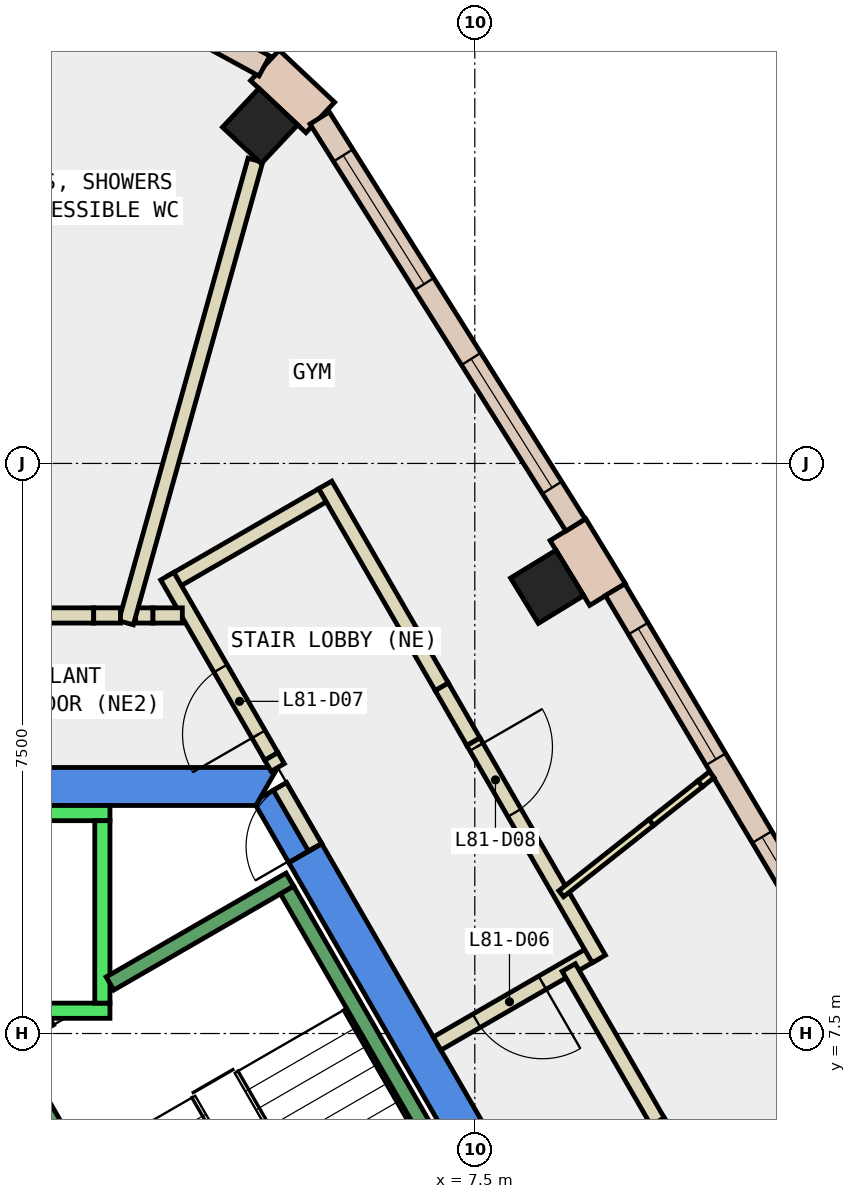
"""IFC4 building model, lengths in metres.
Left out: names, types, materials, properties, quantities, classifications, styles, units other than length and angle.
Written with IfcOpenShell. Run it as: python <this file> out.ifc"""

import sys

from ifc_helpers import new_model, si_unit, direction, frame, frame_2d, origin, origin_2d, place, context, subcontext, project, spatial, polyline, rectangle, outline, extrude, element, fill, save


model = new_model("IFC4")
c1 = context("Model", 3, precision=1e-05, world=origin(), true_north=direction((0.0, 1.0)))
c2 = subcontext(c1, "Body", "Model", "MODEL_VIEW")
j1 = project(units=[si_unit("LENGTHUNIT", "METRE"), si_unit("PLANEANGLEUNIT", "RADIAN")], contexts=[c1])
p1 = place(None, origin())
s1 = spatial("IfcSite", under=j1, at=p1, CompositionType="ELEMENT")
p2 = place(p1, origin())
s2 = spatial("IfcBuilding", under=s1, at=p2, CompositionType="ELEMENT")
p3 = place(p2, frame((0.0, 0.0, 344.9)))
s3 = spatial("IfcBuildingStorey", under=s2, at=p3, CompositionType="ELEMENT", Elevation=344.9)
for number, where, z_axis, x_axis in (
    (1, (8.452, 13.377, -0.35), (0.0, 0.0, 1.0), (-0.522, 0.853, 0.0)),
    (2, (4.675, 19.439, -0.35), (0.0, 0.0, 1.0), (-0.729, 0.685, 0.0)),
):
    element("IfcColumn", number, at=place(p3, frame(where, z_axis=z_axis, x_axis=x_axis)), inside=s3, PredefinedType="COLUMN", context=c2, shape_type="SweptSolid", body=[
        extrude(rectangle(XDim=0.7, YDim=0.7, at=origin_2d()), origin(), (0.0, 0.0, 1.0), 4.4),
    ])
p4 = place(p3, frame((0.0, 0.0, -0.35)))
e3 = element("IfcWall", 3, at=p4, inside=s3, PredefinedType="SHEAR", context=c2, shape_type="SweptSolid", body=[
    extrude(outline(polyline([(5.486, 9.998), (5.053, 9.748), (9.238, 2.5), (9.815, 2.5), (5.486, 9.998)])), origin(), (0.0, 0.0, 1.0), 4.4),
])
p5 = place(p3, frame((0.0, 0.0, 3.6)))
e4 = element("IfcWall", 4, at=p5, inside=s3, PredefinedType="SHEAR", context=c2, shape_type="SweptSolid", body=[
    extrude(outline(polyline([(5.022, 10.8), (4.677, 10.601), (4.619, 10.5), (5.053, 9.748), (5.486, 9.998), (5.022, 10.8)])), origin(), (0.0, 0.0, 1.0), 0.45),
])
p6 = place(p3, frame((0.0, 0.0, -0.35)))
e5 = element("IfcWall", 5, at=p6, inside=s3, PredefinedType="SHEAR", context=c2, shape_type="SweptSolid", body=[
    extrude(outline(polyline([(4.907, 11.0), (-4.907, 11.0), (-4.619, 10.5), (4.619, 10.5), (4.907, 11.0)])), origin(), (0.0, 0.0, 1.0), 4.4),
])
p7 = place(p3, frame((9.246, 13.276, 0.0), z_axis=(0.0, 0.0, 1.0), x_axis=(-0.521232636172, 0.853414634857, 0.0)))
e6 = element("IfcWall", 6, at=p7, inside=s3, PredefinedType="STANDARD", context=c2, shape_type="SweptSolid", body=[
    extrude(rectangle(XDim=1.0, YDim=0.55, at=frame_2d((0.5, 0.0))), origin(), (0.0, 0.0, 1.0), 4.05),
])
p8 = place(p3, frame((5.467, 19.552, 0.0), z_axis=(0.0, 0.0, 1.0), x_axis=(-0.728729965402, 0.684801166416, 0.0)))
e7 = element("IfcWall", 7, at=p8, inside=s3, PredefinedType="STANDARD", context=c2, shape_type="SweptSolid", body=[
    extrude(rectangle(XDim=1.0, YDim=0.55, at=frame_2d((0.5, 0.0))), origin(), (0.0, 0.0, 1.0), 4.05),
])
p9 = place(p3, frame((12.605, 7.854, 0.0), z_axis=(0.0, 0.0, 1.0), x_axis=(-0.510686403068, 0.859767060152, 0.0)))
e8 = element("IfcWall", 8, at=p9, inside=s3, PredefinedType="STANDARD", context=c2, shape_type="SweptSolid", body=[
    extrude(rectangle(XDim=6.38, YDim=0.3, at=frame_2d((3.19, 0.0))), origin(), (0.0, 0.0, 1.0), 4.05),
])
p10 = place(p9, frame((0.595, 0.0, 0.9)))
e9 = element("IfcOpeningElement", 9, at=p10, cuts=e8, PredefinedType="OPENING", context=c2, shape_type="SweptSolid", body=[
    extrude(rectangle(XDim=2.0, YDim=3.0, at=frame_2d((1.0, 1.5))), frame((0.0, 0.16, 0.0), z_axis=(0.0, -1.0, 0.0), x_axis=(1.0, 0.0, 0.0)), (0.0, 0.0, 1.0), 0.32),
])
p11 = place(p9, frame((3.785, 0.0, 0.9)))
e10 = element("IfcOpeningElement", 10, at=p11, cuts=e8, PredefinedType="OPENING", context=c2, shape_type="SweptSolid", body=[
    extrude(rectangle(XDim=2.0, YDim=3.0, at=frame_2d((1.0, 1.5))), frame((0.0, 0.16, 0.0), z_axis=(0.0, -1.0, 0.0), x_axis=(1.0, 0.0, 0.0)), (0.0, 0.0, 1.0), 0.32),
])
p12 = place(p3, frame((8.826, 14.19, 0.0), z_axis=(0.0, 0.0, 1.0), x_axis=(-0.532279831475, 0.846568473902, 0.0)))
e11 = element("IfcWall", 11, at=p12, inside=s3, PredefinedType="STANDARD", context=c2, shape_type="SweptSolid", body=[
    extrude(rectangle(XDim=6.325, YDim=0.3, at=frame_2d((3.163, 0.0))), origin(), (0.0, 0.0, 1.0), 4.05),
])
p13 = place(p12, frame((0.581, 0.0, 0.9)))
e12 = element("IfcOpeningElement", 12, at=p13, cuts=e11, PredefinedType="OPENING", context=c2, shape_type="SweptSolid", body=[
    extrude(rectangle(XDim=2.0, YDim=3.0, at=frame_2d((1.0, 1.5))), frame((0.0, 0.16, 0.0), z_axis=(0.0, -1.0, 0.0), x_axis=(1.0, 0.0, 0.0)), (0.0, 0.0, 1.0), 0.32),
])
p14 = place(p12, frame((3.744, 0.0, 0.9)))
e13 = element("IfcOpeningElement", 13, at=p14, cuts=e11, PredefinedType="OPENING", context=c2, shape_type="SweptSolid", body=[
    extrude(rectangle(XDim=2.0, YDim=3.0, at=frame_2d((1.0, 1.5))), frame((0.0, 0.16, 0.0), z_axis=(0.0, -1.0, 0.0), x_axis=(1.0, 0.0, 0.0)), (0.0, 0.0, 1.0), 0.32),
])
p15 = place(p3, frame((4.732, 20.229, 0.0), z_axis=(0.0, 0.0, 1.0), x_axis=(-0.8782630237, 0.478177855197, 0.0)))
e14 = element("IfcWall", 14, at=p15, inside=s3, PredefinedType="STANDARD", context=c2, shape_type="SweptSolid", body=[
    extrude(rectangle(XDim=4.364, YDim=0.3, at=frame_2d((2.182, 0.0))), origin(), (0.0, 0.0, 1.0), 4.05),
])
p16 = place(p15, frame((1.482, 0.0, 0.9)))
e15 = element("IfcOpeningElement", 15, at=p16, cuts=e14, PredefinedType="OPENING", context=c2, shape_type="SweptSolid", body=[
    extrude(rectangle(XDim=1.4, YDim=3.0, at=frame_2d((0.7, 1.5))), frame((0.0, 0.16, 0.0), z_axis=(0.0, -1.0, 0.0), x_axis=(1.0, 0.0, 0.0)), (0.0, 0.0, 1.0), 0.32),
])
p17 = place(p3, frame((9.082, 8.568, 0.0), z_axis=(0.0, 0.0, 1.0), x_axis=(-0.865955154139, -0.50012165622, 0.0)))
e16 = element("IfcWall", 16, at=p17, inside=s3, PredefinedType="PARTITIONING", context=c2, shape_type="SweptSolid", body=[
    extrude(rectangle(XDim=2.4, YDim=0.2, at=frame_2d((1.2, 0.0))), origin(), (0.0, 0.0, 1.0), 4.05),
])
p18 = place(p17, frame((0.8, 0.0, 0.0)))
e17 = element("IfcOpeningElement", 17, at=p18, cuts=e16, PredefinedType="OPENING", context=c2, shape_type="SweptSolid", body=[
    extrude(rectangle(XDim=1.0, YDim=2.1, at=frame_2d((0.5, 1.05))), frame((0.0, 0.11, 0.0), z_axis=(0.0, -1.0, 0.0), x_axis=(1.0, 0.0, 0.0)), (0.0, 0.0, 1.0), 0.22),
])
p19 = place(p3, frame((4.907, 11.0, 0.0), z_axis=(0.0, 0.0, 1.0), x_axis=(-0.5004692653, 0.865754303766, 0.0)))
e18 = element("IfcWall", 18, at=p19, inside=s3, PredefinedType="PARTITIONING", context=c2, shape_type="SweptSolid", body=[
    extrude(rectangle(XDim=0.17, YDim=0.2, at=frame_2d((0.085, 0.0))), origin(), (0.0, 0.0, 1.0), 2.4),
])
p20 = place(p3, frame((5.532, 14.717, 0.0), z_axis=(0.0, 0.0, 1.0), x_axis=(0.500119776898, -0.865956239515, 0.0)))
e19 = element("IfcWall", 19, at=p20, inside=s3, PredefinedType="PARTITIONING", context=c2, shape_type="SweptSolid", body=[
    extrude(rectangle(XDim=3.067, YDim=0.2, at=frame_2d((1.534, 0.0))), origin(), (0.0, 0.0, 1.0), 4.05),
])
p21 = place(p3, frame((3.504, 13.43, 0.0), z_axis=(0.0, 0.0, 1.0), x_axis=(0.865927408828, 0.500169693844, 0.0)))
e20 = element("IfcWall", 20, at=p21, inside=s3, PredefinedType="PARTITIONING", context=c2, shape_type="SweptSolid", body=[
    extrude(rectangle(XDim=2.3, YDim=0.2, at=frame_2d((1.15, 0.0))), origin(), (0.0, 0.0, 1.0), 4.05),
])
p22 = place(p3, frame((8.736, 8.368, 0.0), z_axis=(0.0, 0.0, 1.0), x_axis=(0.500041339179, -0.866001535283, 0.0)))
e21 = element("IfcWall", 21, at=p22, inside=s3, PredefinedType="PARTITIONING", context=c2, shape_type="SweptSolid", body=[
    extrude(rectangle(XDim=2.342, YDim=0.2, at=frame_2d((1.171, 0.0))), origin(), (0.0, 0.0, 1.0), 4.05),
])
p23 = place(p3, frame((3.038, 13.0, 0.0), z_axis=(0.0, 0.0, 1.0), x_axis=(1.0, 0.0, 0.0)))
e22 = element("IfcWall", 22, at=p23, inside=s3, PredefinedType="PARTITIONING", context=c2, shape_type="SweptSolid", body=[
    extrude(rectangle(XDim=0.228, YDim=0.2, at=frame_2d((0.114, 0.0))), origin(), (0.0, 0.0, 1.0), 1.95),
])
p24 = place(p3, frame((10.617, 10.906, 0.0), z_axis=(0.0, 0.0, 1.0), x_axis=(-0.781848913268, -0.6234679437, 0.0)))
e23 = element("IfcWall", 23, at=p24, inside=s3, PredefinedType="PARTITIONING", context=c2, shape_type="SweptSolid", body=[
    extrude(rectangle(XDim=0.194, YDim=0.1, at=frame_2d((0.097, 0.0))), origin(), (0.0, 0.0, 1.0), 4.05),
])
p25 = place(p3, frame((2.911, 12.904, 0.0), z_axis=(0.0, 0.0, 1.0), x_axis=(0.269389141698, 0.963031406723, 0.0)))
e24 = element("IfcWall", 24, at=p25, inside=s3, PredefinedType="PARTITIONING", context=c2, shape_type="SweptSolid", body=[
    extrude(rectangle(XDim=6.319, YDim=0.2, at=frame_2d((3.159, 0.0))), origin(), (0.0, 0.0, 1.0), 1.95),
])
p26 = place(p3, frame((5.399, 9.948, 0.0), z_axis=(0.0, 0.0, 1.0), x_axis=(-0.499882215713, 0.866093395895, 0.0)))
e25 = element("IfcWall", 25, at=p26, inside=s3, PredefinedType="PARTITIONING", context=c2, shape_type="SweptSolid", body=[
    extrude(rectangle(XDim=0.926, YDim=0.2, at=frame_2d((0.463, 0.0))), origin(), (0.0, 0.0, 1.0), 2.4),
])
p27 = place(p26, frame((0.017, 0.0, 0.0)))
e26 = element("IfcOpeningElement", 26, at=p27, cuts=e25, PredefinedType="OPENING", context=c2, shape_type="SweptSolid", body=[
    extrude(rectangle(XDim=0.9, YDim=2.1, at=frame_2d((0.45, 1.05))), frame((0.0, 0.11, 0.0), z_axis=(0.0, -1.0, 0.0), x_axis=(1.0, 0.0, 0.0)), (0.0, 0.0, 1.0), 0.22),
])
p28 = place(p3, frame((4.822, 11.147, 0.0), z_axis=(0.0, 0.0, 1.0), x_axis=(-0.499871764879, 0.866099427708, 0.0)))
e27 = element("IfcWall", 27, at=p28, inside=s3, PredefinedType="PARTITIONING", context=c2, shape_type="SweptSolid", body=[
    extrude(rectangle(XDim=2.737, YDim=0.2, at=frame_2d((1.368, 0.0))), origin(), (0.0, 0.0, 1.0), 4.05),
])
p29 = place(p28, frame((0.335, 0.0, 0.0)))
e28 = element("IfcOpeningElement", 28, at=p29, cuts=e27, PredefinedType="OPENING", context=c2, shape_type="SweptSolid", body=[
    extrude(rectangle(XDim=1.0, YDim=2.1, at=frame_2d((0.5, 1.05))), frame((0.0, 0.11, 0.0), z_axis=(0.0, -1.0, 0.0), x_axis=(1.0, 0.0, 0.0)), (0.0, 0.0, 1.0), 0.22),
])
p30 = place(p3, frame((7.066, 12.061, 0.0), z_axis=(0.0, 0.0, 1.0), x_axis=(0.499291167461, -0.866434261843, 0.0)))
e29 = element("IfcWall", 29, at=p30, inside=s3, PredefinedType="PARTITIONING", context=c2, shape_type="SweptSolid", body=[
    extrude(rectangle(XDim=0.833, YDim=0.2, at=frame_2d((0.417, 0.0))), origin(), (0.0, 0.0, 1.0), 1.95),
])
p31 = place(p3, frame((7.482, 11.339, 0.0), z_axis=(0.0, 0.0, 1.0), x_axis=(0.49999780286, -0.8660266723, 0.0)))
e30 = element("IfcWall", 30, at=p31, inside=s3, PredefinedType="PARTITIONING", context=c2, shape_type="SweptSolid", body=[
    extrude(rectangle(XDim=3.3, YDim=0.2, at=frame_2d((1.65, 0.0))), origin(), (0.0, 0.0, 1.0), 4.05),
])
p32 = place(p31, frame((0.08, 0.0, 0.0)))
e31 = element("IfcOpeningElement", 31, at=p32, cuts=e30, PredefinedType="OPENING", context=c2, shape_type="SweptSolid", body=[
    extrude(rectangle(XDim=1.0, YDim=2.1, at=frame_2d((0.5, 1.05))), frame((0.0, 0.11, 0.0), z_axis=(0.0, -1.0, 0.0), x_axis=(1.0, 0.0, 0.0)), (0.0, 0.0, 1.0), 0.22),
])
p33 = place(p3, frame((9.907, 6.34, 0.0), z_axis=(0.0, 0.0, 1.0), x_axis=(0.499637970844, -0.866234320545, 0.0)))
e32 = element("IfcWall", 32, at=p33, inside=s3, PredefinedType="PARTITIONING", context=c2, shape_type="SweptSolid", body=[
    extrude(rectangle(XDim=0.75, YDim=0.2, at=frame_2d((0.375, 0.0))), origin(), (0.0, 0.0, 1.0), 1.95),
])
p34 = place(p3, frame((3.266, 13.0, 0.0), z_axis=(0.0, 0.0, 1.0), x_axis=(1.0, 0.0, 0.0)))
e33 = element("IfcWall", 33, at=p34, inside=s3, PredefinedType="PARTITIONING", context=c2, shape_type="SweptSolid", body=[
    extrude(rectangle(XDim=0.386, YDim=0.2, at=frame_2d((0.193, 0.0))), origin(), (0.0, 0.0, 1.0), 4.05),
])
p35 = place(p3, frame((0.35, 13.0, 0.0), z_axis=(0.0, 0.0, 1.0), x_axis=(1.0, 0.0, 0.0)))
e34 = element("IfcWall", 34, at=p35, inside=s3, PredefinedType="PARTITIONING", context=c2, shape_type="SweptSolid", body=[
    extrude(rectangle(XDim=2.136, YDim=0.2, at=frame_2d((1.068, 0.0))), origin(), (0.0, 0.0, 1.0), 4.05),
])
p36 = place(p35, frame((0.509, 0.0, 0.0)))
e35 = element("IfcOpeningElement", 35, at=p36, cuts=e34, PredefinedType="OPENING", context=c2, shape_type="SweptSolid", body=[
    extrude(rectangle(XDim=1.0, YDim=2.1, at=frame_2d((0.5, 1.05))), frame((0.0, 0.11, 0.0), z_axis=(0.0, -1.0, 0.0), x_axis=(1.0, 0.0, 0.0)), (0.0, 0.0, 1.0), 0.22),
])
p37 = place(p3, frame((2.486, 13.0, 0.0), z_axis=(0.0, 0.0, 1.0), x_axis=(1.0, 0.0, 0.0)))
e36 = element("IfcWall", 36, at=p37, inside=s3, PredefinedType="PARTITIONING", context=c2, shape_type="SweptSolid", body=[
    extrude(rectangle(XDim=0.352, YDim=0.2, at=frame_2d((0.176, 0.0))), origin(), (0.0, 0.0, 1.0), 1.95),
])
p38 = place(p3, frame((10.465, 10.785, 0.0), z_axis=(0.0, 0.0, 1.0), x_axis=(-0.784540077819, -0.62007811306, 0.0)))
e37 = element("IfcWall", 37, at=p38, inside=s3, PredefinedType="PARTITIONING", context=c2, shape_type="SweptSolid", body=[
    extrude(rectangle(XDim=0.821, YDim=0.1, at=frame_2d((0.41, 0.0))), origin(), (0.0, 0.0, 1.0), 1.95),
])
p39 = place(p3, frame((9.821, 10.276, 0.0), z_axis=(0.0, 0.0, 1.0), x_axis=(-0.784249073328, -0.620446122548, 0.0)))
e38 = element("IfcWall", 38, at=p39, inside=s3, PredefinedType="PARTITIONING", context=c2, shape_type="SweptSolid", body=[
    extrude(rectangle(XDim=1.51, YDim=0.1, at=frame_2d((0.755, 0.0))), origin(), (0.0, 0.0, 1.0), 4.05),
])
p40 = place(p3, frame((2.7, 7.8, 0.0), z_axis=(0.0, 0.0, 1.0), x_axis=(-1.0, 0.0, 0.0)))
e39 = element("IfcWall", 39, at=p40, inside=s3, PredefinedType="STANDARD", context=c2, shape_type="SweptSolid", body=[
    extrude(rectangle(XDim=5.4, YDim=0.2, at=frame_2d((2.7, 0.0))), origin(), (0.0, 0.0, 1.0), 4.05),
])
p41 = place(p40, frame((1.225, 0.0, 0.0)))
e40 = element("IfcOpeningElement", 40, at=p41, cuts=e39, PredefinedType="OPENING", context=c2, shape_type="SweptSolid", body=[
    extrude(rectangle(XDim=1.1, YDim=2.1, at=frame_2d((0.55, 1.05))), frame((0.0, 0.11, 0.0), z_axis=(0.0, -1.0, 0.0), x_axis=(1.0, 0.0, 0.0)), (0.0, 0.0, 1.0), 0.22),
])
p42 = place(p40, frame((3.075, 0.0, 0.0)))
e41 = element("IfcOpeningElement", 41, at=p42, cuts=e39, PredefinedType="OPENING", context=c2, shape_type="SweptSolid", body=[
    extrude(rectangle(XDim=1.1, YDim=2.1, at=frame_2d((0.55, 1.05))), frame((0.0, 0.11, 0.0), z_axis=(0.0, -1.0, 0.0), x_axis=(1.0, 0.0, 0.0)), (0.0, 0.0, 1.0), 0.22),
])
p43 = place(p3, frame((2.7, 10.4, 0.0), z_axis=(0.0, 0.0, 1.0), x_axis=(-1.0, 0.0, 0.0)))
e42 = element("IfcWall", 42, at=p43, inside=s3, PredefinedType="STANDARD", context=c2, shape_type="SweptSolid", body=[
    extrude(rectangle(XDim=5.4, YDim=0.2, at=frame_2d((2.7, 0.0))), origin(), (0.0, 0.0, 1.0), 4.05),
])
p44 = place(p3, frame((2.6, 7.9, 0.0), z_axis=(0.0, 0.0, 1.0), x_axis=(0.0, 1.0, 0.0)))
e43 = element("IfcWall", 43, at=p44, inside=s3, PredefinedType="STANDARD", context=c2, shape_type="SweptSolid", body=[
    extrude(rectangle(XDim=2.4, YDim=0.2, at=frame_2d((1.2, 0.0))), origin(), (0.0, 0.0, 1.0), 4.05),
])
p45 = place(p3, frame((2.7, 8.158, 0.0), z_axis=(0.0, 0.0, 1.0), x_axis=(0.86611865017, 0.499838457731, 0.0)))
e44 = element("IfcWall", 44, at=p45, inside=s3, PredefinedType="STANDARD", context=c2, shape_type="SweptSolid", body=[
    extrude(rectangle(XDim=2.733, YDim=0.2, at=frame_2d((1.366, 0.0))), origin(), (0.0, 0.0, 1.0), 4.05),
])
p46 = place(p3, frame((1.256, 7.324, 0.0), z_axis=(0.0, 0.0, 1.0), x_axis=(0.865915093549, 0.500191014278, 0.0)))
e45 = element("IfcWall", 45, at=p46, inside=s3, PredefinedType="STANDARD", context=c2, shape_type="SweptSolid", body=[
    extrude(rectangle(XDim=0.752, YDim=0.2, at=frame_2d((0.376, 0.0))), origin(), (0.0, 0.0, 1.0), 4.05),
])
p47 = place(p3, frame((4.843, 1.312, 0.0), z_axis=(0.0, 0.0, 1.0), x_axis=(-0.499963383562, 0.866046543262, 0.0)))
e46 = element("IfcWall", 46, at=p47, inside=s3, PredefinedType="STANDARD", context=c2, shape_type="SweptSolid", body=[
    extrude(rectangle(XDim=6.9, YDim=0.2, at=frame_2d((3.45, 0.0))), origin(), (0.0, 0.0, 1.0), 4.05),
])
p48 = place(p47, frame((0.45, 0.0, 0.0)))
e47 = element("IfcOpeningElement", 47, at=p48, cuts=e46, PredefinedType="OPENING", context=c2, shape_type="SweptSolid", body=[
    extrude(rectangle(XDim=1.1, YDim=2.2, at=frame_2d((0.55, 1.1))), frame((0.0, 0.11, 0.0), z_axis=(0.0, -1.0, 0.0), x_axis=(1.0, 0.0, 0.0)), (0.0, 0.0, 1.0), 0.22),
])
p49 = place(p3, frame((8.48, 3.412, 0.0), z_axis=(0.0, 0.0, 1.0), x_axis=(-0.499978703459, 0.866037698999, 0.0)))
e48 = element("IfcWall", 48, at=p49, inside=s3, PredefinedType="STANDARD", context=c2, shape_type="SweptSolid", body=[
    extrude(rectangle(XDim=6.9, YDim=0.2, at=frame_2d((3.45, 0.0))), origin(), (0.0, 0.0, 1.0), 4.05),
])
p50 = place(p10, origin())
e49 = element("IfcWindow", 49, at=p50, inside=s3, PartitioningType="SINGLE_PANEL", PredefinedType="WINDOW", context=c2, shape_type="SweptSolid", body=[
    extrude(rectangle(XDim=2.0, YDim=3.0, at=frame_2d((1.0, 1.5))), frame((0.0, 0.03, 0.0), z_axis=(0.0, -1.0, 0.0), x_axis=(1.0, 0.0, 0.0)), (0.0, 0.0, 1.0), 0.06),
])
fill(e9, e49)
p51 = place(p11, origin())
e50 = element("IfcWindow", 50, at=p51, inside=s3, PartitioningType="SINGLE_PANEL", PredefinedType="WINDOW", context=c2, shape_type="SweptSolid", body=[
    extrude(rectangle(XDim=2.0, YDim=3.0, at=frame_2d((1.0, 1.5))), frame((0.0, 0.03, 0.0), z_axis=(0.0, -1.0, 0.0), x_axis=(1.0, 0.0, 0.0)), (0.0, 0.0, 1.0), 0.06),
])
fill(e10, e50)
p52 = place(p13, origin())
e51 = element("IfcWindow", 51, at=p52, inside=s3, PartitioningType="SINGLE_PANEL", PredefinedType="WINDOW", context=c2, shape_type="SweptSolid", body=[
    extrude(rectangle(XDim=2.0, YDim=3.0, at=frame_2d((1.0, 1.5))), frame((0.0, 0.03, 0.0), z_axis=(0.0, -1.0, 0.0), x_axis=(1.0, 0.0, 0.0)), (0.0, 0.0, 1.0), 0.06),
])
fill(e12, e51)
p53 = place(p14, origin())
e52 = element("IfcWindow", 52, at=p53, inside=s3, PartitioningType="SINGLE_PANEL", PredefinedType="WINDOW", context=c2, shape_type="SweptSolid", body=[
    extrude(rectangle(XDim=2.0, YDim=3.0, at=frame_2d((1.0, 1.5))), frame((0.0, 0.03, 0.0), z_axis=(0.0, -1.0, 0.0), x_axis=(1.0, 0.0, 0.0)), (0.0, 0.0, 1.0), 0.06),
])
fill(e13, e52)
p54 = place(p18, origin())
e53 = element("IfcDoor", 53, at=p54, inside=s3, OperationType="SINGLE_SWING_LEFT", PredefinedType="DOOR", context=c2, shape_type="SweptSolid", body=[
    extrude(rectangle(XDim=1.0, YDim=2.1, at=frame_2d((0.5, 1.05))), frame((0.0, 0.025, 0.0), z_axis=(0.0, -1.0, 0.0), x_axis=(1.0, 0.0, 0.0)), (0.0, 0.0, 1.0), 0.05),
])
fill(e17, e53)
p55 = place(p29, origin())
e54 = element("IfcDoor", 54, at=p55, inside=s3, OperationType="SINGLE_SWING_RIGHT", PredefinedType="DOOR", context=c2, shape_type="SweptSolid", body=[
    extrude(rectangle(XDim=1.0, YDim=2.1, at=frame_2d((0.5, 1.05))), frame((0.0, 0.025, 0.0), z_axis=(0.0, -1.0, 0.0), x_axis=(1.0, 0.0, 0.0)), (0.0, 0.0, 1.0), 0.05),
])
fill(e28, e54)
p56 = place(p32, origin())
e55 = element("IfcDoor", 55, at=p56, inside=s3, OperationType="SINGLE_SWING_LEFT", PredefinedType="DOOR", context=c2, shape_type="SweptSolid", body=[
    extrude(rectangle(XDim=1.0, YDim=2.1, at=frame_2d((0.5, 1.05))), frame((0.0, 0.025, 0.0), z_axis=(0.0, -1.0, 0.0), x_axis=(1.0, 0.0, 0.0)), (0.0, 0.0, 1.0), 0.05),
])
fill(e31, e55)
p57 = place(p27, origin())
e56 = element("IfcDoor", 56, at=p57, inside=s3, OperationType="SINGLE_SWING_LEFT", PredefinedType="DOOR", context=c2, shape_type="SweptSolid", body=[
    extrude(rectangle(XDim=0.9, YDim=2.1, at=frame_2d((0.45, 1.05))), frame((0.0, 0.025, 0.0), z_axis=(0.0, -1.0, 0.0), x_axis=(1.0, 0.0, 0.0)), (0.0, 0.0, 1.0), 0.05),
])
fill(e26, e56)
save(model, sys.argv[1])
